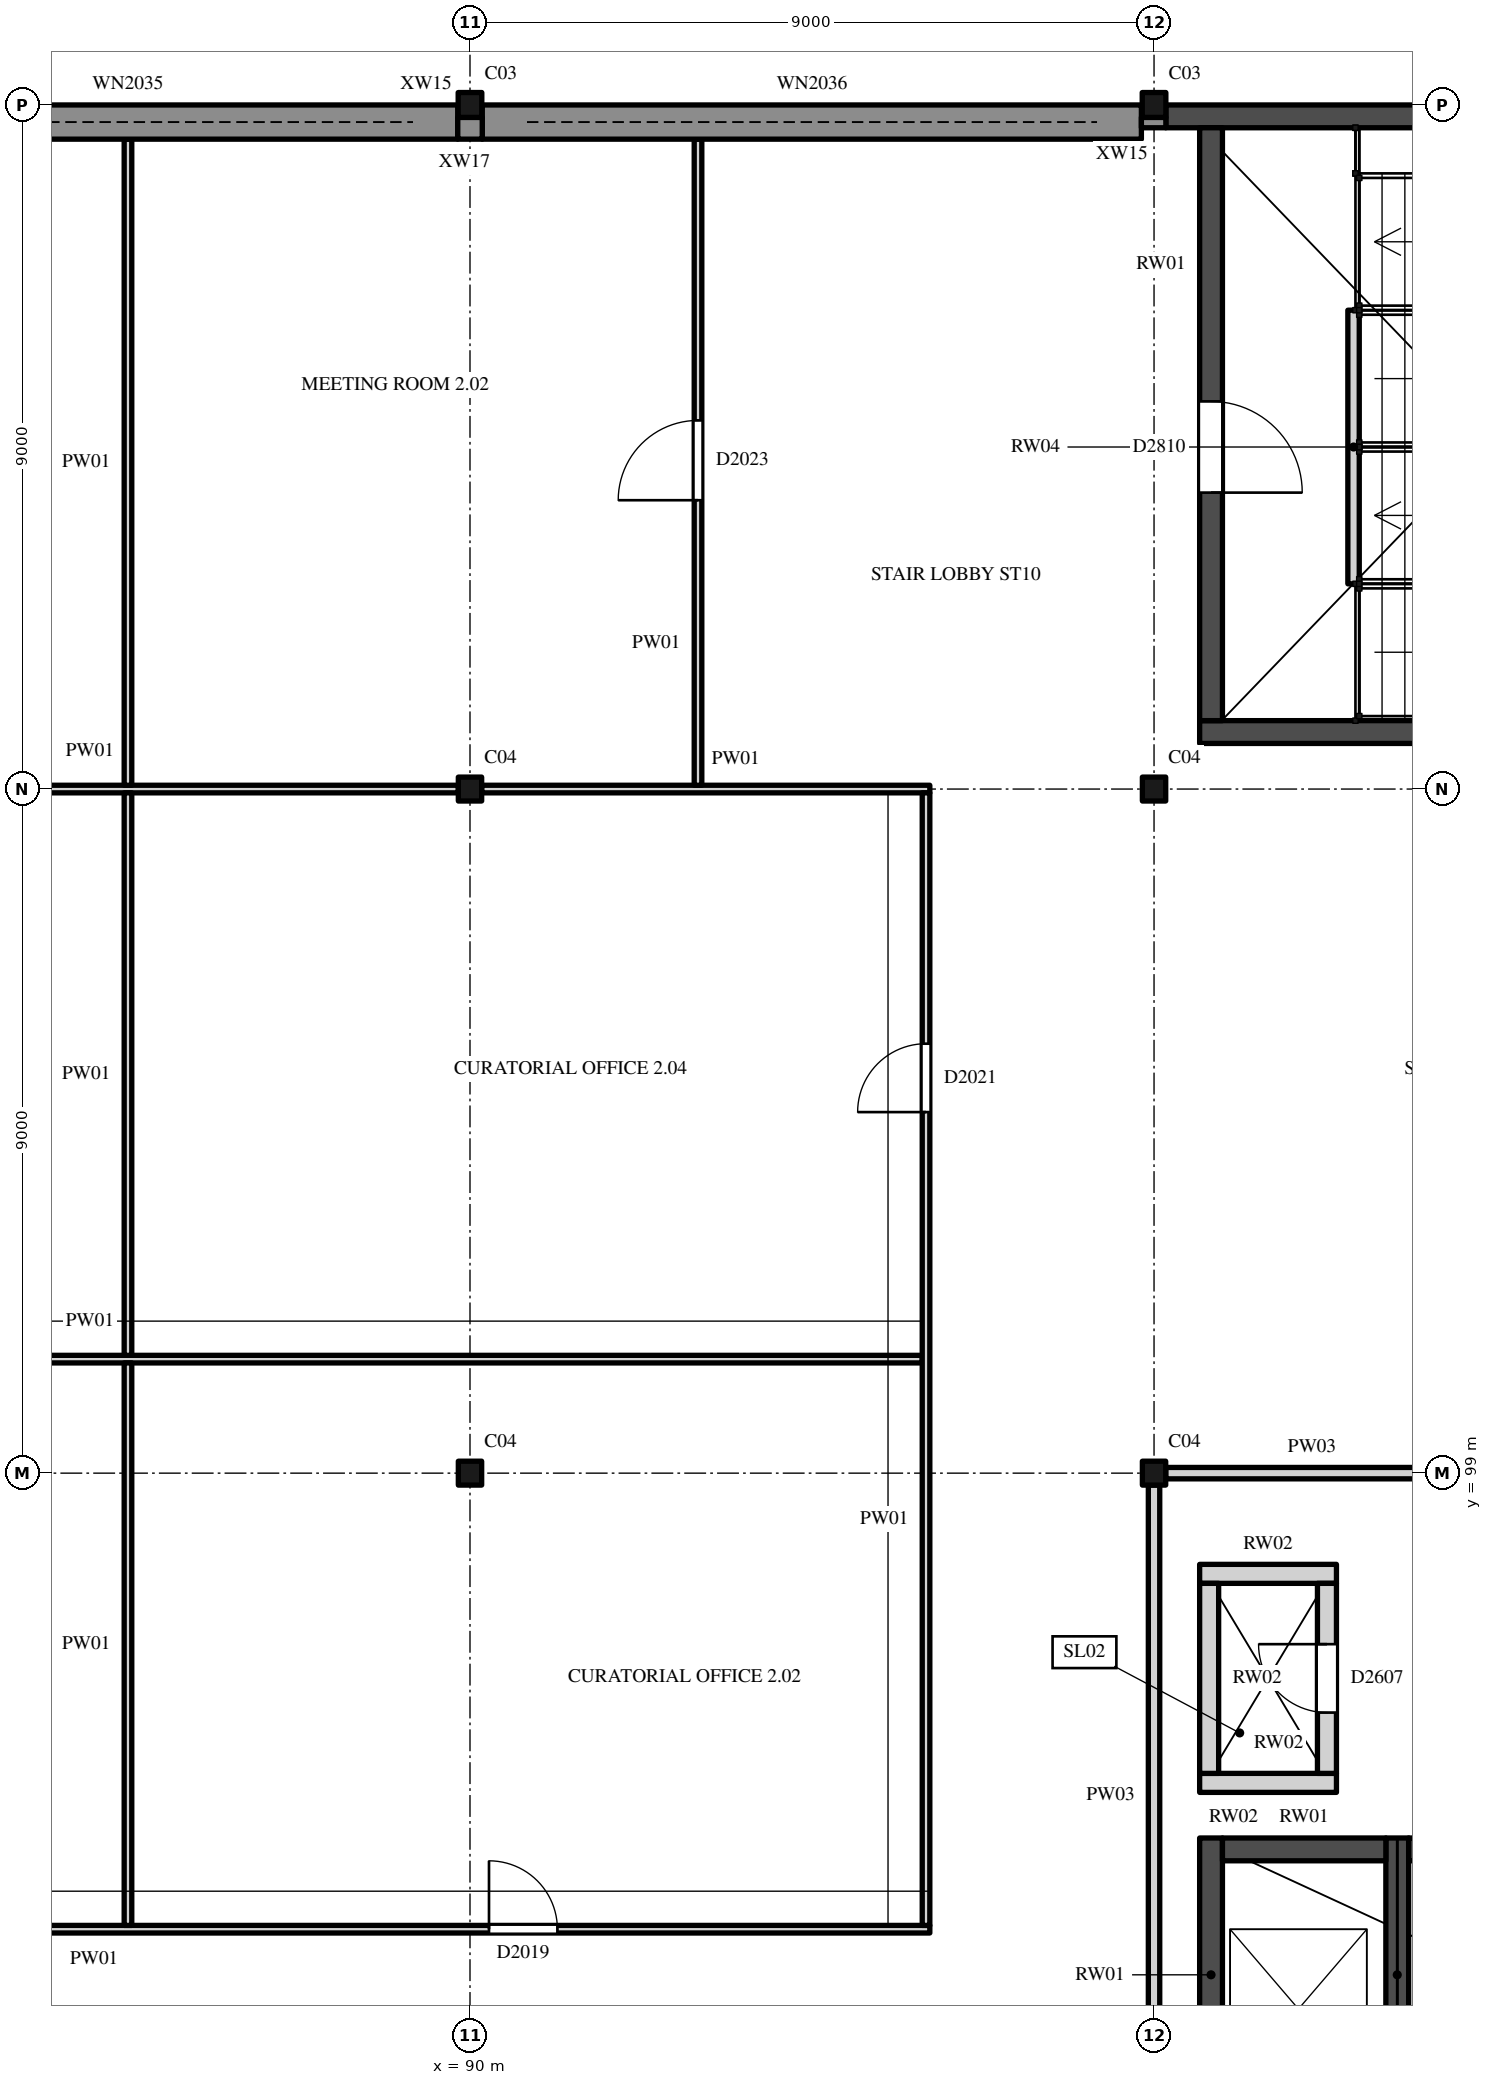
"""IFC4 building model, lengths in metres.
Left out: names, types, materials, properties, quantities, classifications, styles, units other than length and angle.
Written with IfcOpenShell. Run it as: python <this file> out.ifc"""

import sys

from ifc_helpers import new_model, si_unit, direction, frame, frame_2d, origin, origin_2d, place, context, subcontext, project, spatial, rectangle, i_section, extrude, element, fill, save


model = new_model("IFC4")
c1 = context("Model", 3, precision=1e-05, world=origin(), true_north=direction((0.0, 1.0)))
c2 = subcontext(c1, "Body", "Model", "MODEL_VIEW")
j1 = project(units=[si_unit("LENGTHUNIT", "METRE"), si_unit("PLANEANGLEUNIT", "RADIAN")], contexts=[c1])
p1 = place(None, origin())
s1 = spatial("IfcSite", under=j1, at=p1, CompositionType="ELEMENT")
p2 = place(p1, origin())
s2 = spatial("IfcBuilding", under=s1, at=p2, CompositionType="ELEMENT")
p3 = place(p2, frame((0.0, 0.0, 11.0)))
s3 = spatial("IfcBuildingStorey", under=s2, at=p3, CompositionType="ELEMENT", Elevation=11.0)
for number, where, z_axis, x_axis in (
    (1, (90.0, 99.0, 0.0), (0.0, 0.0, 1.0), (1.0, 0.0, 0.0)),
    (2, (99.0, 99.0, 0.0), (0.0, 0.0, 1.0), (1.0, 0.0, 0.0)),
    (3, (90.0, 108.0, 0.0), (0.0, 0.0, 1.0), (1.0, 0.0, 0.0)),
    (4, (99.0, 108.0, 0.0), (0.0, 0.0, 1.0), (1.0, 0.0, 0.0)),
):
    element("IfcColumn", number, at=place(p3, frame(where, z_axis=z_axis, x_axis=x_axis)), inside=s3, PredefinedType="COLUMN", context=c2, shape_type="SweptSolid", body=[
        extrude(i_section(OverallWidth=0.307, OverallDepth=0.315, WebThickness=0.012, FlangeThickness=0.019, FilletRadius=0.017, at=origin_2d()), origin(), (0.0, 0.0, 1.0), 5.0),
    ])
for number, where, z_axis, x_axis in (
    (5, (90.0, 117.0, 0.0), (0.0, 0.0, 1.0), (1.0, 0.0, 0.0)),
    (6, (99.0, 117.0, 0.0), (0.0, 0.0, 1.0), (1.0, 0.0, 0.0)),
):
    element("IfcColumn", number, at=place(p3, frame(where, z_axis=z_axis, x_axis=x_axis)), inside=s3, PredefinedType="COLUMN", context=c2, shape_type="SweptSolid", body=[
        extrude(i_section(OverallWidth=0.311, OverallDepth=0.327, WebThickness=0.016, FlangeThickness=0.025, FilletRadius=0.017, at=origin_2d()), origin(), (0.0, 0.0, 1.0), 5.0),
    ])
p4 = place(p3, frame((99.6, 108.75, 0.0), z_axis=(0.0, 0.0, 1.0), x_axis=(1.0, 0.0, 0.0)))
e7 = element("IfcWall", 7, at=p4, inside=s3, PredefinedType="SHEAR", context=c2, shape_type="SweptSolid", body=[
    extrude(rectangle(XDim=7.8, YDim=0.3, at=frame_2d((3.9, 0.0))), origin(), (0.0, 0.0, 1.0), 5.0),
])
p5 = place(p3, frame((99.156, 116.85, 0.0), z_axis=(0.0, 0.0, 1.0), x_axis=(1.0, 0.0, 0.0)))
e8 = element("IfcWall", 8, at=p5, inside=s3, PredefinedType="SHEAR", context=c2, shape_type="SweptSolid", body=[
    extrude(rectangle(XDim=8.689, YDim=0.3, at=frame_2d((4.344, 0.0))), origin(), (0.0, 0.0, 1.0), 5.0),
])
p6 = place(p3, frame((99.75, 108.9, 0.0), z_axis=(0.0, 0.0, 1.0), x_axis=(0.0, 1.0, 0.0)))
e9 = element("IfcWall", 9, at=p6, inside=s3, PredefinedType="SHEAR", context=c2, shape_type="SweptSolid", body=[
    extrude(rectangle(XDim=7.8, YDim=0.3, at=frame_2d((3.9, 0.0))), origin(), (0.0, 0.0, 1.0), 5.0),
])
p7 = place(p6, frame((3.0, 0.0, 0.0)))
e10 = element("IfcOpeningElement", 10, at=p7, cuts=e9, PredefinedType="OPENING", context=c2, shape_type="SweptSolid", body=[
    extrude(rectangle(XDim=1.2, YDim=2.1, at=frame_2d((0.6, 1.05))), frame((0.0, 0.16, 0.0), z_axis=(0.0, -1.0, 0.0), x_axis=(1.0, 0.0, 0.0)), (0.0, 0.0, 1.0), 0.32),
])
p8 = place(p3, frame((101.625, 110.7, 0.0), z_axis=(0.0, 0.0, 1.0), x_axis=(0.0, 1.0, 0.0)))
e11 = element("IfcWall", 11, at=p8, inside=s3, PredefinedType="STANDARD", context=c2, shape_type="SweptSolid", body=[
    extrude(rectangle(XDim=3.6, YDim=0.15, at=frame_2d((1.8, 0.0))), origin(), (0.0, 0.0, 1.0), 2.3),
])
for number, where, z_axis, x_axis in (
    (12, (99.75, 90.6, 0.0), (0.0, 0.0, 1.0), (0.0, 1.0, 0.0)),
    (13, (102.2, 90.6, 0.0), (0.0, 0.0, 1.0), (0.0, 1.0, 0.0)),
):
    element("IfcWall", number, at=place(p3, frame(where, z_axis=z_axis, x_axis=x_axis)), inside=s3, PredefinedType="SHEAR", context=c2, shape_type="SweptSolid", body=[
        extrude(rectangle(XDim=3.6, YDim=0.3, at=frame_2d((1.8, 0.0))), origin(), (0.0, 0.0, 1.0), 5.0),
    ])
p9 = place(p3, frame((99.9, 94.05, 0.0), z_axis=(0.0, 0.0, 1.0), x_axis=(1.0, 0.0, 0.0)))
e14 = element("IfcWall", 14, at=p9, inside=s3, PredefinedType="SHEAR", context=c2, shape_type="SweptSolid", body=[
    extrude(rectangle(XDim=2.15, YDim=0.3, at=frame_2d((1.075, 0.0))), origin(), (0.0, 0.0, 1.0), 5.0),
])
p10 = place(p3, frame((102.35, 94.05, 0.0), z_axis=(0.0, 0.0, 1.0), x_axis=(1.0, 0.0, 0.0)))
e15 = element("IfcWall", 15, at=p10, inside=s3, PredefinedType="SHEAR", context=c2, shape_type="SweptSolid", body=[
    extrude(rectangle(XDim=2.3, YDim=0.3, at=frame_2d((1.15, 0.0))), origin(), (0.0, 0.0, 1.0), 5.0),
])
for number, where, z_axis, x_axis in (
    (16, (99.6, 94.925, 0.0), (0.0, 0.0, 1.0), (1.0, 0.0, 0.0)),
    (17, (99.6, 97.675, 0.0), (0.0, 0.0, 1.0), (1.0, 0.0, 0.0)),
):
    element("IfcWall", number, at=place(p3, frame(where, z_axis=z_axis, x_axis=x_axis)), inside=s3, PredefinedType="STANDARD", context=c2, shape_type="SweptSolid", body=[
        extrude(rectangle(XDim=1.8, YDim=0.25, at=frame_2d((0.9, 0.0))), origin(), (0.0, 0.0, 1.0), 5.0),
    ])
p11 = place(p3, frame((99.725, 95.05, 0.0), z_axis=(0.0, 0.0, 1.0), x_axis=(0.0, 1.0, 0.0)))
e18 = element("IfcWall", 18, at=p11, inside=s3, PredefinedType="STANDARD", context=c2, shape_type="SweptSolid", body=[
    extrude(rectangle(XDim=2.5, YDim=0.25, at=frame_2d((1.25, 0.0))), origin(), (0.0, 0.0, 1.0), 5.0),
])
p12 = place(p3, frame((101.275, 95.05, 0.0), z_axis=(0.0, 0.0, 1.0), x_axis=(0.0, 1.0, 0.0)))
e19 = element("IfcWall", 19, at=p12, inside=s3, PredefinedType="STANDARD", context=c2, shape_type="SweptSolid", body=[
    extrude(rectangle(XDim=2.5, YDim=0.25, at=frame_2d((1.25, 0.0))), origin(), (0.0, 0.0, 1.0), 5.0),
])
p13 = place(p12, frame((0.8, 0.0, 0.0)))
e20 = element("IfcOpeningElement", 20, at=p13, cuts=e19, PredefinedType="OPENING", context=c2, shape_type="SweptSolid", body=[
    extrude(rectangle(XDim=0.9, YDim=2.1, at=frame_2d((0.45, 1.05))), frame((0.0, 0.135, 0.0), z_axis=(0.0, -1.0, 0.0), x_axis=(1.0, 0.0, 0.0)), (0.0, 0.0, 1.0), 0.27),
])
p14 = place(p3, frame((81.161, 116.775, 0.0), z_axis=(0.0, 0.0, 1.0), x_axis=(1.0, 0.0, 0.0)))
e21 = element("IfcWall", 21, at=p14, inside=s3, PredefinedType="SOLIDWALL", context=c2, shape_type="SweptSolid", body=[
    extrude(rectangle(XDim=8.678, YDim=0.45, at=frame_2d((4.339, 0.0))), origin(), (0.0, 0.0, 1.0), 4.469),
])
p15 = place(p14, frame((0.589, 0.0, 1.6)))
e22 = element("IfcOpeningElement", 22, at=p15, cuts=e21, PredefinedType="OPENING", context=c2, shape_type="SweptSolid", body=[
    extrude(rectangle(XDim=7.5, YDim=1.2, at=frame_2d((3.75, 0.6))), frame((0.0, 0.235, 0.0), z_axis=(0.0, -1.0, 0.0), x_axis=(1.0, 0.0, 0.0)), (0.0, 0.0, 1.0), 0.47),
])
p16 = place(p3, frame((90.161, 116.775, 0.0), z_axis=(0.0, 0.0, 1.0), x_axis=(1.0, 0.0, 0.0)))
e23 = element("IfcWall", 23, at=p16, inside=s3, PredefinedType="SOLIDWALL", context=c2, shape_type="SweptSolid", body=[
    extrude(rectangle(XDim=8.673, YDim=0.45, at=frame_2d((4.336, 0.0))), origin(), (0.0, 0.0, 1.0), 4.469),
])
p17 = place(p16, frame((0.589, 0.0, 1.6)))
e24 = element("IfcOpeningElement", 24, at=p17, cuts=e23, PredefinedType="OPENING", context=c2, shape_type="SweptSolid", body=[
    extrude(rectangle(XDim=7.5, YDim=1.2, at=frame_2d((3.75, 0.6))), frame((0.0, 0.235, 0.0), z_axis=(0.0, -1.0, 0.0), x_axis=(1.0, 0.0, 0.0)), (0.0, 0.0, 1.0), 0.47),
])
p18 = place(p3, frame((89.839, 116.693, 0.0), z_axis=(0.0, 0.0, 1.0), x_axis=(1.0, 0.0, 0.0)))
e25 = element("IfcWall", 25, at=p18, inside=s3, PredefinedType="SOLIDWALL", context=c2, shape_type="SweptSolid", body=[
    extrude(rectangle(XDim=0.322, YDim=0.286, at=frame_2d((0.161, 0.0))), origin(), (0.0, 0.0, 1.0), 4.469),
])
p19 = place(p3, frame((98.833, 116.768, 0.0), z_axis=(0.0, 0.0, 1.0), x_axis=(1.0, 0.0, 0.0)))
e26 = element("IfcWall", 26, at=p19, inside=s3, PredefinedType="SOLIDWALL", context=c2, shape_type="SweptSolid", body=[
    extrude(rectangle(XDim=0.322, YDim=0.136, at=frame_2d((0.161, 0.0))), origin(), (0.0, 0.0, 1.0), 5.0),
])
p20 = place(p3, frame((74.95, 93.0, 0.0), z_axis=(0.0, 0.0, 1.0), x_axis=(1.0, 0.0, 0.0)))
e27 = element("IfcWall", 27, at=p20, inside=s3, PredefinedType="PARTITIONING", context=c2, shape_type="SweptSolid", body=[
    extrude(rectangle(XDim=21.1, YDim=0.1, at=frame_2d((10.55, 0.0))), origin(), (0.0, 0.0, 1.0), 4.469),
])
p21 = place(p20, frame((4.8, 0.0, 0.0)))
e28 = element("IfcOpeningElement", 28, at=p21, cuts=e27, PredefinedType="OPENING", context=c2, shape_type="SweptSolid", body=[
    extrude(rectangle(XDim=0.9, YDim=2.1, at=frame_2d((0.45, 1.05))), frame((0.0, 0.06, 0.0), z_axis=(0.0, -1.0, 0.0), x_axis=(1.0, 0.0, 0.0)), (0.0, 0.0, 1.0), 0.12),
])
p22 = place(p20, frame((15.3, 0.0, 0.0)))
e29 = element("IfcOpeningElement", 29, at=p22, cuts=e27, PredefinedType="OPENING", context=c2, shape_type="SweptSolid", body=[
    extrude(rectangle(XDim=0.9, YDim=2.1, at=frame_2d((0.45, 1.05))), frame((0.0, 0.06, 0.0), z_axis=(0.0, -1.0, 0.0), x_axis=(1.0, 0.0, 0.0)), (0.0, 0.0, 1.0), 0.12),
])
p23 = place(p3, frame((99.154, 99.0, 0.0), z_axis=(0.0, 0.0, 1.0), x_axis=(1.0, 0.0, 0.0)))
e30 = element("IfcWall", 30, at=p23, inside=s3, PredefinedType="PARTITIONING", context=c2, shape_type="SweptSolid", body=[
    extrude(rectangle(XDim=8.693, YDim=0.15, at=frame_2d((4.346, 0.0))), origin(), (0.0, 0.0, 1.0), 4.469),
])
p24 = place(p23, frame((3.85, 0.0, 0.0)))
e31 = element("IfcOpeningElement", 31, at=p24, cuts=e30, PredefinedType="OPENING", context=c2, shape_type="SweptSolid", body=[
    extrude(rectangle(XDim=1.0, YDim=2.4, at=frame_2d((0.5, 1.2))), frame((0.0, 0.085, 0.0), z_axis=(0.0, -1.0, 0.0), x_axis=(1.0, 0.0, 0.0)), (0.0, 0.0, 1.0), 0.17),
])
p25 = place(p3, frame((75.05, 100.5, 0.0), z_axis=(0.0, 0.0, 1.0), x_axis=(1.0, 0.0, 0.0)))
e32 = element("IfcWall", 32, at=p25, inside=s3, PredefinedType="PARTITIONING", context=c2, shape_type="SweptSolid", body=[
    extrude(rectangle(XDim=20.9, YDim=0.1, at=frame_2d((10.45, 0.0))), origin(), (0.0, 0.0, 1.0), 4.825),
])
p26 = place(p3, frame((81.154, 108.0, 0.0), z_axis=(0.0, 0.0, 1.0), x_axis=(1.0, 0.0, 0.0)))
e33 = element("IfcWall", 33, at=p26, inside=s3, PredefinedType="PARTITIONING", context=c2, shape_type="SweptSolid", body=[
    extrude(rectangle(XDim=8.693, YDim=0.1, at=frame_2d((4.346, 0.0))), origin(), (0.0, 0.0, 1.0), 4.469),
])
p27 = place(p3, frame((90.154, 108.0, 0.0), z_axis=(0.0, 0.0, 1.0), x_axis=(1.0, 0.0, 0.0)))
e34 = element("IfcWall", 34, at=p27, inside=s3, PredefinedType="PARTITIONING", context=c2, shape_type="SweptSolid", body=[
    extrude(rectangle(XDim=5.896, YDim=0.1, at=frame_2d((2.948, 0.0))), origin(), (0.0, 0.0, 1.0), 4.469),
])
for number, where, z_axis, x_axis in (
    (35, (85.5, 93.05, 0.0), (0.0, 0.0, 1.0), (0.0, 1.0, 0.0)),
    (36, (85.5, 100.55, 0.0), (0.0, 0.0, 1.0), (0.0, 1.0, 0.0)),
):
    element("IfcWall", number, at=place(p3, frame(where, z_axis=z_axis, x_axis=x_axis)), inside=s3, PredefinedType="PARTITIONING", context=c2, shape_type="SweptSolid", body=[
        extrude(rectangle(XDim=7.4, YDim=0.1, at=frame_2d((3.7, 0.0))), origin(), (0.0, 0.0, 1.0), 4.825),
    ])
p28 = place(p3, frame((85.5, 108.05, 0.0), z_axis=(0.0, 0.0, 1.0), x_axis=(0.0, 1.0, 0.0)))
e37 = element("IfcWall", 37, at=p28, inside=s3, PredefinedType="PARTITIONING", context=c2, shape_type="SweptSolid", body=[
    extrude(rectangle(XDim=8.5, YDim=0.1, at=frame_2d((4.25, 0.0))), origin(), (0.0, 0.0, 1.0), 4.825),
])
p29 = place(p3, frame((93.0, 108.05, 0.0), z_axis=(0.0, 0.0, 1.0), x_axis=(0.0, 1.0, 0.0)))
e38 = element("IfcWall", 38, at=p29, inside=s3, PredefinedType="PARTITIONING", context=c2, shape_type="SweptSolid", body=[
    extrude(rectangle(XDim=8.5, YDim=0.1, at=frame_2d((4.25, 0.0))), origin(), (0.0, 0.0, 1.0), 4.825),
])
p30 = place(p29, frame((3.75, 0.0, 0.0)))
e39 = element("IfcOpeningElement", 39, at=p30, cuts=e38, PredefinedType="OPENING", context=c2, shape_type="SweptSolid", body=[
    extrude(rectangle(XDim=1.05, YDim=2.1, at=frame_2d((0.525, 1.05))), frame((0.0, 0.06, 0.0), z_axis=(0.0, -1.0, 0.0), x_axis=(1.0, 0.0, 0.0)), (0.0, 0.0, 1.0), 0.12),
])
p31 = place(p3, frame((96.0, 93.05, 0.0), z_axis=(0.0, 0.0, 1.0), x_axis=(0.0, 1.0, 0.0)))
e40 = element("IfcWall", 40, at=p31, inside=s3, PredefinedType="PARTITIONING", context=c2, shape_type="SweptSolid", body=[
    extrude(rectangle(XDim=14.9, YDim=0.1, at=frame_2d((7.45, 0.0))), origin(), (0.0, 0.0, 1.0), 4.825),
])
p32 = place(p31, frame((10.7, 0.0, 0.0)))
e41 = element("IfcOpeningElement", 41, at=p32, cuts=e40, PredefinedType="OPENING", context=c2, shape_type="SweptSolid", body=[
    extrude(rectangle(XDim=0.9, YDim=2.1, at=frame_2d((0.45, 1.05))), frame((0.0, 0.06, 0.0), z_axis=(0.0, -1.0, 0.0), x_axis=(1.0, 0.0, 0.0)), (0.0, 0.0, 1.0), 0.12),
])
p33 = place(p3, frame((99.0, 90.675, 0.0), z_axis=(0.0, 0.0, 1.0), x_axis=(0.0, 1.0, 0.0)))
e42 = element("IfcWall", 42, at=p33, inside=s3, PredefinedType="PARTITIONING", context=c2, shape_type="SweptSolid", body=[
    extrude(rectangle(XDim=8.168, YDim=0.15, at=frame_2d((4.084, 0.0))), origin(), (0.0, 0.0, 1.0), 4.371),
])
p34 = place(p7, origin())
e43 = element("IfcDoor", 43, at=p34, inside=s3, OperationType="SINGLE_SWING_LEFT", PredefinedType="DOOR", context=c2, shape_type="SweptSolid", body=[
    extrude(rectangle(XDim=1.2, YDim=2.1, at=frame_2d((0.6, 1.05))), frame((0.0, 0.025, 0.0), z_axis=(0.0, -1.0, 0.0), x_axis=(1.0, 0.0, 0.0)), (0.0, 0.0, 1.0), 0.05),
])
fill(e10, e43)
p35 = place(p13, origin())
e44 = element("IfcDoor", 44, at=p35, inside=s3, OperationType="SINGLE_SWING_LEFT", PredefinedType="DOOR", context=c2, shape_type="SweptSolid", body=[
    extrude(rectangle(XDim=0.9, YDim=2.1, at=frame_2d((0.45, 1.05))), frame((0.0, 0.025, 0.0), z_axis=(0.0, -1.0, 0.0), x_axis=(1.0, 0.0, 0.0)), (0.0, 0.0, 1.0), 0.05),
])
fill(e20, e44)
p36 = place(p15, origin())
e45 = element("IfcWindow", 45, at=p36, inside=s3, PartitioningType="SINGLE_PANEL", PredefinedType="WINDOW", context=c2, shape_type="SweptSolid", body=[
    extrude(rectangle(XDim=7.5, YDim=1.2, at=frame_2d((3.75, 0.6))), frame((0.0, 0.03, 0.0), z_axis=(0.0, -1.0, 0.0), x_axis=(1.0, 0.0, 0.0)), (0.0, 0.0, 1.0), 0.06),
])
fill(e22, e45)
p37 = place(p17, origin())
e46 = element("IfcWindow", 46, at=p37, inside=s3, PartitioningType="SINGLE_PANEL", PredefinedType="WINDOW", context=c2, shape_type="SweptSolid", body=[
    extrude(rectangle(XDim=7.5, YDim=1.2, at=frame_2d((3.75, 0.6))), frame((0.0, 0.03, 0.0), z_axis=(0.0, -1.0, 0.0), x_axis=(1.0, 0.0, 0.0)), (0.0, 0.0, 1.0), 0.06),
])
fill(e24, e46)
p38 = place(p22, origin())
e47 = element("IfcDoor", 47, at=p38, inside=s3, OperationType="SINGLE_SWING_RIGHT", PredefinedType="DOOR", context=c2, shape_type="SweptSolid", body=[
    extrude(rectangle(XDim=0.9, YDim=2.1, at=frame_2d((0.45, 1.05))), frame((0.0, 0.025, 0.0), z_axis=(0.0, -1.0, 0.0), x_axis=(1.0, 0.0, 0.0)), (0.0, 0.0, 1.0), 0.05),
])
fill(e29, e47)
p39 = place(p32, origin())
e48 = element("IfcDoor", 48, at=p39, inside=s3, OperationType="SINGLE_SWING_RIGHT", PredefinedType="DOOR", context=c2, shape_type="SweptSolid", body=[
    extrude(rectangle(XDim=0.9, YDim=2.1, at=frame_2d((0.45, 1.05))), frame((0.0, 0.025, 0.0), z_axis=(0.0, -1.0, 0.0), x_axis=(1.0, 0.0, 0.0)), (0.0, 0.0, 1.0), 0.05),
])
fill(e41, e48)
p40 = place(p30, origin())
e49 = element("IfcDoor", 49, at=p40, inside=s3, OperationType="SINGLE_SWING_RIGHT", PredefinedType="DOOR", context=c2, shape_type="SweptSolid", body=[
    extrude(rectangle(XDim=1.05, YDim=2.1, at=frame_2d((0.525, 1.05))), frame((0.0, 0.025, 0.0), z_axis=(0.0, -1.0, 0.0), x_axis=(1.0, 0.0, 0.0)), (0.0, 0.0, 1.0), 0.05),
])
fill(e39, e49)
save(model, sys.argv[1])
